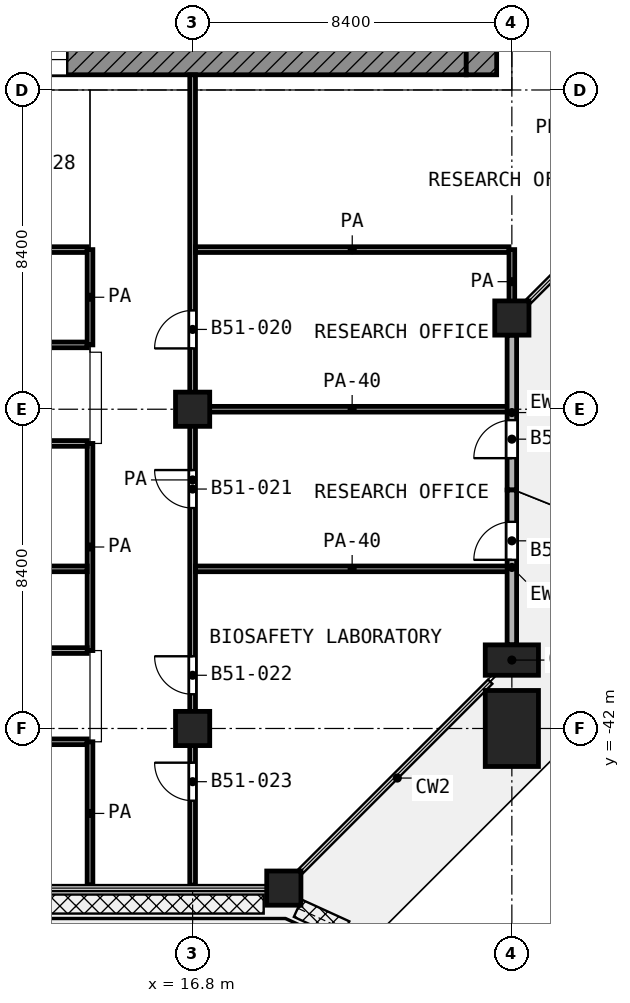
"""IFC4 building model, lengths in metres.
Left out: names, types, materials, properties, quantities, classifications, styles, units other than length and angle.
Written with IfcOpenShell. Run it as: python <this file> out.ifc"""

import sys

from ifc_helpers import new_model, si_unit, direction, frame, frame_2d, origin, origin_2d, place, context, subcontext, project, spatial, rectangle, extrude, element, fill, save


model = new_model("IFC4")
c1 = context("Model", 3, precision=1e-05, world=origin(), true_north=direction((0.0, 1.0)))
c2 = subcontext(c1, "Body", "Model", "MODEL_VIEW")
j1 = project(units=[si_unit("LENGTHUNIT", "METRE"), si_unit("PLANEANGLEUNIT", "RADIAN")], contexts=[c1])
p1 = place(None, origin())
s1 = spatial("IfcSite", under=j1, at=p1, CompositionType="ELEMENT")
p2 = place(p1, origin())
s2 = spatial("IfcBuilding", under=s1, at=p2, CompositionType="ELEMENT")
p3 = place(p2, frame((0.0, 0.0, 222.2)))
s3 = spatial("IfcBuildingStorey", under=s2, at=p3, CompositionType="ELEMENT", Elevation=222.2)
for number, where, z_axis, x_axis in (
    (1, (25.2, -31.2, 0.0), (0.0, 0.0, 1.0), (1.0, 0.0, 0.0)),
    (2, (16.8, -33.6, 0.0), (0.0, 0.0, 1.0), (1.0, 0.0, 0.0)),
):
    element("IfcColumn", number, at=place(p3, frame(where, z_axis=z_axis, x_axis=x_axis)), inside=s3, PredefinedType="COLUMN", context=c2, shape_type="SweptSolid", body=[
        extrude(rectangle(XDim=0.9, YDim=0.9, at=origin_2d()), origin(), (0.0, 0.0, 1.0), 4.2),
    ])
p4 = place(p3, frame((25.2, -40.2, 0.0), z_axis=(0.0, 0.0, 1.0), x_axis=(0.0, -1.0, 0.0)))
e3 = element("IfcColumn", 3, at=p4, inside=s3, PredefinedType="COLUMN", context=c2, shape_type="SweptSolid", body=[
    extrude(rectangle(XDim=0.8, YDim=1.4, at=origin_2d()), origin(), (0.0, 0.0, 1.0), 4.2),
])
for number, where, z_axis, x_axis in (
    (4, (16.8, -42.0, 0.0), (0.0, 0.0, 1.0), (1.0, 0.0, 0.0)),
    (5, (19.2, -46.2, 0.0), (0.0, 0.0, 1.0), (1.0, 0.0, 0.0)),
):
    element("IfcColumn", number, at=place(p3, frame(where, z_axis=z_axis, x_axis=x_axis)), inside=s3, PredefinedType="COLUMN", context=c2, shape_type="SweptSolid", body=[
        extrude(rectangle(XDim=0.9, YDim=0.9, at=origin_2d()), origin(), (0.0, 0.0, 1.0), 4.2),
    ])
p5 = place(p3, frame((25.2, -42.0, 0.0), z_axis=(0.0, 0.0, 1.0), x_axis=(0.0, -1.0, 0.0)))
e6 = element("IfcColumn", 6, at=p5, inside=s3, PredefinedType="COLUMN", context=c2, shape_type="SweptSolid", body=[
    extrude(rectangle(XDim=2.0, YDim=1.4, at=origin_2d()), origin(), (0.0, 0.0, 1.0), 4.2),
])
p6 = place(p3, frame((25.2, -39.8, 0.0), z_axis=(0.0, 0.0, 1.0), x_axis=(0.0, 1.0, 0.0)))
e7 = element("IfcWall", 7, at=p6, inside=s3, PredefinedType="SOLIDWALL", context=c2, shape_type="SweptSolid", body=[
    extrude(rectangle(XDim=4.075, YDim=0.25, at=frame_2d((2.038, 0.0))), origin(), (0.0, 0.0, 1.0), 2.58),
])
p7 = place(p6, frame((2.238, 0.0, 0.0)))
e8 = element("IfcOpeningElement", 8, at=p7, cuts=e7, PredefinedType="OPENING", context=c2, shape_type="SweptSolid", body=[
    extrude(rectangle(XDim=1.0, YDim=2.1, at=frame_2d((0.5, 1.05))), frame((0.0, 0.135, 0.0), z_axis=(0.0, -1.0, 0.0), x_axis=(1.0, 0.0, 0.0)), (0.0, 0.0, 1.0), 0.27),
])
p8 = place(p3, frame((25.2, -35.725, 0.0), z_axis=(0.0, 0.0, 1.0), x_axis=(0.0, 1.0, 0.0)))
e9 = element("IfcWall", 9, at=p8, inside=s3, PredefinedType="SOLIDWALL", context=c2, shape_type="SweptSolid", body=[
    extrude(rectangle(XDim=4.075, YDim=0.25, at=frame_2d((2.038, 0.0))), origin(), (0.0, 0.0, 1.0), 2.58),
])
p9 = place(p8, frame((0.837, 0.0, 0.0)))
e10 = element("IfcOpeningElement", 10, at=p9, cuts=e9, PredefinedType="OPENING", context=c2, shape_type="SweptSolid", body=[
    extrude(rectangle(XDim=1.0, YDim=2.1, at=frame_2d((0.5, 1.05))), frame((0.0, 0.135, 0.0), z_axis=(0.0, -1.0, 0.0), x_axis=(1.0, 0.0, 0.0)), (0.0, 0.0, 1.0), 0.27),
])
p10 = place(p3, frame((5.4, -24.4, 0.0), z_axis=(0.0, 0.0, 1.0), x_axis=(1.0, 0.0, 0.0)))
e11 = element("IfcWall", 11, at=p10, inside=s3, PredefinedType="SHEAR", context=c2, shape_type="SweptSolid", body=[
    extrude(rectangle(XDim=18.6, YDim=0.8, at=frame_2d((9.3, 0.0))), origin(), (0.0, 0.0, 1.0), 3.6),
])
p11 = place(p10, frame((6.3, 0.0, 0.0)))
e12 = element("IfcOpeningElement", 12, at=p11, cuts=e11, PredefinedType="OPENING", context=c2, shape_type="SweptSolid", body=[
    extrude(rectangle(XDim=1.8, YDim=2.1, at=frame_2d((0.9, 1.05))), frame((0.0, 0.41, 0.0), z_axis=(0.0, -1.0, 0.0), x_axis=(1.0, 0.0, 0.0)), (0.0, 0.0, 1.0), 0.82),
])
p12 = place(p3, frame((24.4, -24.8, 0.0), z_axis=(0.0, 0.0, 1.0), x_axis=(0.0, 1.0, 0.0)))
e13 = element("IfcWall", 13, at=p12, inside=s3, PredefinedType="SHEAR", context=c2, shape_type="SweptSolid", body=[
    extrude(rectangle(XDim=0.8, YDim=0.8, at=frame_2d((0.4, 0.0))), origin(), (0.0, 0.0, 1.0), 3.6),
])
p13 = place(p3, frame((2.327, -42.35, 0.0), z_axis=(0.0, 0.0, 1.0), x_axis=(1.0, 0.0, 0.0)))
e14 = element("IfcWall", 14, at=p13, inside=s3, PredefinedType="PARTITIONING", context=c2, shape_type="SweptSolid", body=[
    extrude(rectangle(XDim=11.698, YDim=0.15, at=frame_2d((5.849, 0.0))), origin(), (0.0, 0.0, 1.0), 3.6),
])
p14 = place(p13, frame((7.324, 0.0, 0.0)))
e15 = element("IfcOpeningElement", 15, at=p14, cuts=e14, PredefinedType="OPENING", context=c2, shape_type="SweptSolid", body=[
    extrude(rectangle(XDim=1.0, YDim=2.1, at=frame_2d((0.5, 1.05))), frame((0.0, 0.085, 0.0), z_axis=(0.0, -1.0, 0.0), x_axis=(1.0, 0.0, 0.0)), (0.0, 0.0, 1.0), 0.17),
])
p15 = place(p13, frame((3.374, 0.0, 0.0)))
e16 = element("IfcOpeningElement", 16, at=p15, cuts=e14, PredefinedType="OPENING", context=c2, shape_type="SweptSolid", body=[
    extrude(rectangle(XDim=1.0, YDim=2.1, at=frame_2d((0.5, 1.05))), frame((0.0, 0.085, 0.0), z_axis=(0.0, -1.0, 0.0), x_axis=(1.0, 0.0, 0.0)), (0.0, 0.0, 1.0), 0.17),
])
p16 = place(p3, frame((8.73, -39.95, 0.0), z_axis=(0.0, 0.0, 1.0), x_axis=(1.0, 0.0, 0.0)))
e17 = element("IfcWall", 17, at=p16, inside=s3, PredefinedType="PARTITIONING", context=c2, shape_type="SweptSolid", body=[
    extrude(rectangle(XDim=5.295, YDim=0.15, at=frame_2d((2.647, 0.0))), origin(), (0.0, 0.0, 1.0), 3.6),
])
p17 = place(p16, frame((2.185, 0.0, 0.0)))
e18 = element("IfcOpeningElement", 18, at=p17, cuts=e17, PredefinedType="OPENING", context=c2, shape_type="SweptSolid", body=[
    extrude(rectangle(XDim=1.0, YDim=2.1, at=frame_2d((0.5, 1.05))), frame((0.0, 0.085, 0.0), z_axis=(0.0, -1.0, 0.0), x_axis=(1.0, 0.0, 0.0)), (0.0, 0.0, 1.0), 0.17),
])
p18 = place(p3, frame((8.73, -37.8, 0.0), z_axis=(0.0, 0.0, 1.0), x_axis=(1.0, 0.0, 0.0)))
e19 = element("IfcWall", 19, at=p18, inside=s3, PredefinedType="PARTITIONING", context=c2, shape_type="SweptSolid", body=[
    extrude(rectangle(XDim=5.295, YDim=0.15, at=frame_2d((2.647, 0.0))), origin(), (0.0, 0.0, 1.0), 3.6),
])
p19 = place(p3, frame((16.875, -37.8, 0.0), z_axis=(0.0, 0.0, 1.0), x_axis=(1.0, 0.0, 0.0)))
e20 = element("IfcWall", 20, at=p19, inside=s3, PredefinedType="PARTITIONING", context=c2, shape_type="SweptSolid", body=[
    extrude(rectangle(XDim=8.245, YDim=0.15, at=frame_2d((4.123, 0.0))), origin(), (0.0, 0.0, 1.0), 2.7),
])
p20 = place(p3, frame((8.925, -34.5, 0.0), z_axis=(0.0, 0.0, 1.0), x_axis=(1.0, 0.0, 0.0)))
e21 = element("IfcWall", 21, at=p20, inside=s3, PredefinedType="PARTITIONING", context=c2, shape_type="SweptSolid", body=[
    extrude(rectangle(XDim=5.1, YDim=0.15, at=frame_2d((2.55, 0.0))), origin(), (0.0, 0.0, 1.0), 3.6),
])
p21 = place(p20, frame((2.05, 0.0, 0.0)))
e22 = element("IfcOpeningElement", 22, at=p21, cuts=e21, PredefinedType="OPENING", context=c2, shape_type="SweptSolid", body=[
    extrude(rectangle(XDim=1.0, YDim=2.1, at=frame_2d((0.5, 1.05))), frame((0.0, 0.085, 0.0), z_axis=(0.0, -1.0, 0.0), x_axis=(1.0, 0.0, 0.0)), (0.0, 0.0, 1.0), 0.17),
])
p22 = place(p3, frame((16.875, -33.6, 0.0), z_axis=(0.0, 0.0, 1.0), x_axis=(1.0, 0.0, 0.0)))
e23 = element("IfcWall", 23, at=p22, inside=s3, PredefinedType="PARTITIONING", context=c2, shape_type="SweptSolid", body=[
    extrude(rectangle(XDim=8.245, YDim=0.15, at=frame_2d((4.123, 0.0))), origin(), (0.0, 0.0, 1.0), 2.7),
])
p23 = place(p3, frame((1.077, -31.907, 0.0), z_axis=(0.0, 0.0, 1.0), x_axis=(1.0, 0.0, 0.0)))
e24 = element("IfcWall", 24, at=p23, inside=s3, PredefinedType="PARTITIONING", context=c2, shape_type="SweptSolid", body=[
    extrude(rectangle(XDim=12.948, YDim=0.15, at=frame_2d((6.474, 0.0))), origin(), (0.0, 0.0, 1.0), 3.6),
])
p24 = place(p23, frame((5.874, 0.0, 0.0)))
e25 = element("IfcOpeningElement", 25, at=p24, cuts=e24, PredefinedType="OPENING", context=c2, shape_type="SweptSolid", body=[
    extrude(rectangle(XDim=1.0, YDim=2.1, at=frame_2d((0.5, 1.05))), frame((0.0, 0.085, 0.0), z_axis=(0.0, -1.0, 0.0), x_axis=(1.0, 0.0, 0.0)), (0.0, 0.0, 1.0), 0.17),
])
p25 = place(p3, frame((11.178, -29.4, 0.0), z_axis=(0.0, 0.0, 1.0), x_axis=(1.0, 0.0, 0.0)))
e26 = element("IfcWall", 26, at=p25, inside=s3, PredefinedType="PARTITIONING", context=c2, shape_type="SweptSolid", body=[
    extrude(rectangle(XDim=2.847, YDim=0.15, at=frame_2d((1.423, 0.0))), origin(), (0.0, 0.0, 1.0), 3.6),
])
p26 = place(p3, frame((16.875, -29.4, 0.0), z_axis=(0.0, 0.0, 1.0), x_axis=(1.0, 0.0, 0.0)))
e27 = element("IfcWall", 27, at=p26, inside=s3, PredefinedType="PARTITIONING", context=c2, shape_type="SweptSolid", body=[
    extrude(rectangle(XDim=8.25, YDim=0.15, at=frame_2d((4.125, 0.0))), origin(), (0.0, 0.0, 1.0), 3.6),
])
p27 = place(p3, frame((14.1, -46.12, 0.0), z_axis=(0.0, 0.0, 1.0), x_axis=(0.0, 1.0, 0.0)))
e28 = element("IfcWall", 28, at=p27, inside=s3, PredefinedType="PARTITIONING", context=c2, shape_type="SweptSolid", body=[
    extrude(rectangle(XDim=3.77, YDim=0.15, at=frame_2d((1.885, 0.0))), origin(), (0.0, 0.0, 1.0), 3.6),
])
p28 = place(p3, frame((14.1, -39.95, 0.0), z_axis=(0.0, 0.0, 1.0), x_axis=(0.0, 1.0, 0.0)))
e29 = element("IfcWall", 29, at=p28, inside=s3, PredefinedType="PARTITIONING", context=c2, shape_type="SweptSolid", body=[
    extrude(rectangle(XDim=5.45, YDim=0.15, at=frame_2d((2.725, 0.0))), origin(), (0.0, 0.0, 1.0), 3.6),
])
p29 = place(p3, frame((14.1, -31.907, 0.0), z_axis=(0.0, 0.0, 1.0), x_axis=(0.0, 1.0, 0.0)))
e30 = element("IfcWall", 30, at=p29, inside=s3, PredefinedType="PARTITIONING", context=c2, shape_type="SweptSolid", body=[
    extrude(rectangle(XDim=2.507, YDim=0.15, at=frame_2d((1.253, 0.0))), origin(), (0.0, 0.0, 1.0), 3.6),
])
p30 = place(p3, frame((16.8, -46.12, 0.0), z_axis=(0.0, 0.0, 1.0), x_axis=(0.0, 1.0, 0.0)))
e31 = element("IfcWall", 31, at=p30, inside=s3, PredefinedType="PARTITIONING", context=c2, shape_type="SweptSolid", body=[
    extrude(rectangle(XDim=21.32, YDim=0.15, at=frame_2d((10.66, 0.0))), origin(), (0.0, 0.0, 1.0), 3.6),
])
p31 = place(p30, frame((14.12, 0.0, 0.0)))
e32 = element("IfcOpeningElement", 32, at=p31, cuts=e31, PredefinedType="OPENING", context=c2, shape_type="SweptSolid", body=[
    extrude(rectangle(XDim=1.0, YDim=2.1, at=frame_2d((0.5, 1.05))), frame((0.0, 0.085, 0.0), z_axis=(0.0, -1.0, 0.0), x_axis=(1.0, 0.0, 0.0)), (0.0, 0.0, 1.0), 0.17),
])
p32 = place(p30, frame((9.92, 0.0, 0.0)))
e33 = element("IfcOpeningElement", 33, at=p32, cuts=e31, PredefinedType="OPENING", context=c2, shape_type="SweptSolid", body=[
    extrude(rectangle(XDim=1.0, YDim=2.1, at=frame_2d((0.5, 1.05))), frame((0.0, 0.085, 0.0), z_axis=(0.0, -1.0, 0.0), x_axis=(1.0, 0.0, 0.0)), (0.0, 0.0, 1.0), 0.17),
])
p33 = place(p30, frame((5.02, 0.0, 0.0)))
e34 = element("IfcOpeningElement", 34, at=p33, cuts=e31, PredefinedType="OPENING", context=c2, shape_type="SweptSolid", body=[
    extrude(rectangle(XDim=1.0, YDim=2.1, at=frame_2d((0.5, 1.05))), frame((0.0, 0.085, 0.0), z_axis=(0.0, -1.0, 0.0), x_axis=(1.0, 0.0, 0.0)), (0.0, 0.0, 1.0), 0.17),
])
p34 = place(p30, frame((2.22, 0.0, 0.0)))
e35 = element("IfcOpeningElement", 35, at=p34, cuts=e31, PredefinedType="OPENING", context=c2, shape_type="SweptSolid", body=[
    extrude(rectangle(XDim=1.0, YDim=2.1, at=frame_2d((0.5, 1.05))), frame((0.0, 0.085, 0.0), z_axis=(0.0, -1.0, 0.0), x_axis=(1.0, 0.0, 0.0)), (0.0, 0.0, 1.0), 0.17),
])
p35 = place(p3, frame((25.2, -31.087, 0.0), z_axis=(0.0, 0.0, 1.0), x_axis=(0.0, 1.0, 0.0)))
e36 = element("IfcWall", 36, at=p35, inside=s3, PredefinedType="PARTITIONING", context=c2, shape_type="SweptSolid", body=[
    extrude(rectangle(XDim=1.687, YDim=0.15, at=frame_2d((0.844, 0.0))), origin(), (0.0, 0.0, 1.0), 3.6),
])
p36 = place(p7, origin())
e37 = element("IfcDoor", 37, at=p36, inside=s3, OperationType="SINGLE_SWING_LEFT", PredefinedType="DOOR", context=c2, shape_type="SweptSolid", body=[
    extrude(rectangle(XDim=1.0, YDim=2.1, at=frame_2d((0.5, 1.05))), frame((0.0, 0.025, 0.0), z_axis=(0.0, -1.0, 0.0), x_axis=(1.0, 0.0, 0.0)), (0.0, 0.0, 1.0), 0.05),
])
fill(e8, e37)
p37 = place(p9, origin())
e38 = element("IfcDoor", 38, at=p37, inside=s3, OperationType="SINGLE_SWING_LEFT", PredefinedType="DOOR", context=c2, shape_type="SweptSolid", body=[
    extrude(rectangle(XDim=1.0, YDim=2.1, at=frame_2d((0.5, 1.05))), frame((0.0, 0.025, 0.0), z_axis=(0.0, -1.0, 0.0), x_axis=(1.0, 0.0, 0.0)), (0.0, 0.0, 1.0), 0.05),
])
fill(e10, e38)
p38 = place(p11, origin())
e39 = element("IfcDoor", 39, at=p38, inside=s3, OperationType="DOUBLE_DOOR_SINGLE_SWING", PredefinedType="DOOR", context=c2, shape_type="SweptSolid", body=[
    extrude(rectangle(XDim=1.8, YDim=2.1, at=frame_2d((0.9, 1.05))), frame((0.0, 0.025, 0.0), z_axis=(0.0, -1.0, 0.0), x_axis=(1.0, 0.0, 0.0)), (0.0, 0.0, 1.0), 0.05),
])
fill(e12, e39)
p39 = place(p31, origin())
e40 = element("IfcDoor", 40, at=p39, inside=s3, OperationType="SINGLE_SWING_LEFT", PredefinedType="DOOR", context=c2, shape_type="SweptSolid", body=[
    extrude(rectangle(XDim=1.0, YDim=2.1, at=frame_2d((0.5, 1.05))), frame((0.0, 0.025, 0.0), z_axis=(0.0, -1.0, 0.0), x_axis=(1.0, 0.0, 0.0)), (0.0, 0.0, 1.0), 0.05),
])
fill(e32, e40)
p40 = place(p32, origin())
e41 = element("IfcDoor", 41, at=p40, inside=s3, OperationType="SINGLE_SWING_RIGHT", PredefinedType="DOOR", context=c2, shape_type="SweptSolid", body=[
    extrude(rectangle(XDim=1.0, YDim=2.1, at=frame_2d((0.5, 1.05))), frame((0.0, 0.025, 0.0), z_axis=(0.0, -1.0, 0.0), x_axis=(1.0, 0.0, 0.0)), (0.0, 0.0, 1.0), 0.05),
])
fill(e33, e41)
p41 = place(p33, origin())
e42 = element("IfcDoor", 42, at=p41, inside=s3, OperationType="SINGLE_SWING_RIGHT", PredefinedType="DOOR", context=c2, shape_type="SweptSolid", body=[
    extrude(rectangle(XDim=1.0, YDim=2.1, at=frame_2d((0.5, 1.05))), frame((0.0, 0.025, 0.0), z_axis=(0.0, -1.0, 0.0), x_axis=(1.0, 0.0, 0.0)), (0.0, 0.0, 1.0), 0.05),
])
fill(e34, e42)
p42 = place(p34, origin())
e43 = element("IfcDoor", 43, at=p42, inside=s3, OperationType="SINGLE_SWING_RIGHT", PredefinedType="DOOR", context=c2, shape_type="SweptSolid", body=[
    extrude(rectangle(XDim=1.0, YDim=2.1, at=frame_2d((0.5, 1.05))), frame((0.0, 0.025, 0.0), z_axis=(0.0, -1.0, 0.0), x_axis=(1.0, 0.0, 0.0)), (0.0, 0.0, 1.0), 0.05),
])
fill(e35, e43)
save(model, sys.argv[1])
